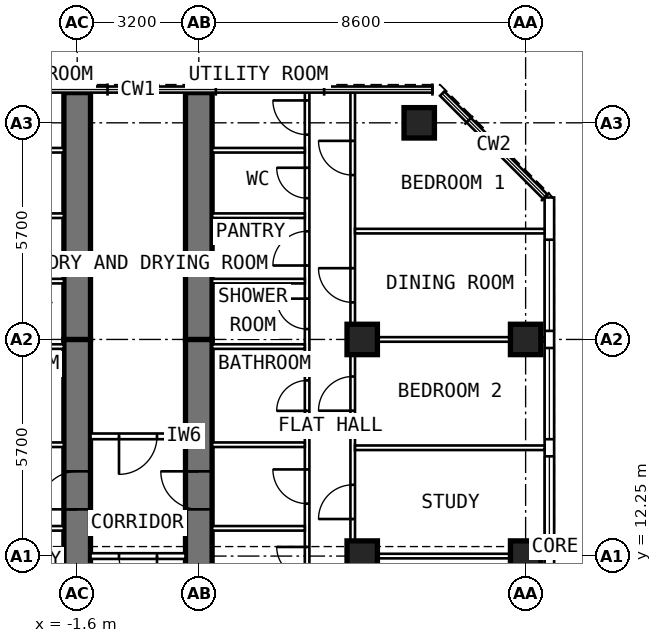
"""IFC4 building model, lengths in metres.
Left out: names, types, materials, properties, quantities, classifications, styles, units other than length and angle.
Written with IfcOpenShell. Run it as: python <this file> out.ifc"""

import sys

from ifc_helpers import new_model, si_unit, direction, frame, frame_2d, origin, origin_2d, place, context, subcontext, project, spatial, rectangle, extrude, element, fill, save


model = new_model("IFC4")
c1 = context("Model", 3, precision=1e-05, world=origin(), true_north=direction((0.0, 1.0)))
c2 = subcontext(c1, "Body", "Model", "MODEL_VIEW")
j1 = project(units=[si_unit("LENGTHUNIT", "METRE"), si_unit("PLANEANGLEUNIT", "RADIAN")], contexts=[c1])
p1 = place(None, origin())
s1 = spatial("IfcSite", under=j1, at=p1, CompositionType="ELEMENT")
p2 = place(p1, origin())
s2 = spatial("IfcBuilding", under=s1, at=p2, CompositionType="ELEMENT")
p3 = place(p2, frame((0.0, 0.0, 285.4)))
s3 = spatial("IfcBuildingStorey", under=s2, at=p3, CompositionType="ELEMENT", Elevation=285.4)
for number, where, z_axis, x_axis in (
    (1, (10.2, 12.25, 0.0), (0.0, 0.0, 1.0), (0.0, 1.0, 0.0)),
    (2, (10.2, 17.95, 0.0), (0.0, 0.0, 1.0), (0.0, 1.0, 0.0)),
    (3, (7.4, 23.65, 0.0), (0.0, 0.0, 1.0), (0.0, 1.0, 0.0)),
    (4, (5.9, 12.25, 0.0), (0.0, 0.0, 1.0), (0.0, 1.0, 0.0)),
    (5, (5.9, 17.95, 0.0), (0.0, 0.0, 1.0), (0.0, 1.0, 0.0)),
):
    element("IfcColumn", number, at=place(p3, frame(where, z_axis=z_axis, x_axis=x_axis)), inside=s3, PredefinedType="COLUMN", context=c2, shape_type="SweptSolid", body=[
        extrude(rectangle(XDim=0.8, YDim=0.8, at=origin_2d()), origin(), (0.0, 0.0, 1.0), 3.6),
    ])
p4 = place(p3, frame((-1.6, 9.6, 0.0), z_axis=(0.0, 0.0, 1.0), x_axis=(0.0, 1.0, 0.0)))
e6 = element("IfcWall", 6, at=p4, inside=s3, PredefinedType="SHEAR", context=c2, shape_type="SweptSolid", body=[
    extrude(rectangle(XDim=8.35, YDim=0.7, at=frame_2d((4.175, 0.0))), origin(), (0.0, 0.0, 1.0), 3.6),
])
p5 = place(p4, frame((3.88, 0.0, 0.0)))
e7 = element("IfcOpeningElement", 7, at=p5, cuts=e6, PredefinedType="OPENING", context=c2, shape_type="SweptSolid", body=[
    extrude(rectangle(XDim=1.0, YDim=2.1, at=frame_2d((0.5, 1.05))), frame((0.0, 0.362, 0.0), z_axis=(0.0, -1.0, 0.0), x_axis=(1.0, 0.0, 0.0)), (0.0, 0.0, 1.0), 0.724),
])
p6 = place(p3, frame((-1.6, 17.95, 0.0), z_axis=(0.0, 0.0, 1.0), x_axis=(0.0, 1.0, 0.0)))
e8 = element("IfcWall", 8, at=p6, inside=s3, PredefinedType="SHEAR", context=c2, shape_type="SweptSolid", body=[
    extrude(rectangle(XDim=6.495, YDim=0.7, at=frame_2d((3.248, 0.0))), origin(), (0.0, 0.0, 1.0), 3.6),
])
p7 = place(p3, frame((1.6, 9.6, 0.0), z_axis=(0.0, 0.0, 1.0), x_axis=(0.0, 1.0, 0.0)))
e9 = element("IfcWall", 9, at=p7, inside=s3, PredefinedType="SHEAR", context=c2, shape_type="SweptSolid", body=[
    extrude(rectangle(XDim=8.35, YDim=0.7, at=frame_2d((4.175, 0.0))), origin(), (0.0, 0.0, 1.0), 3.6),
])
p8 = place(p7, frame((3.88, 0.0, 0.0)))
e10 = element("IfcOpeningElement", 10, at=p8, cuts=e9, PredefinedType="OPENING", context=c2, shape_type="SweptSolid", body=[
    extrude(rectangle(XDim=1.0, YDim=2.1, at=frame_2d((0.5, 1.05))), frame((0.0, 0.362, 0.0), z_axis=(0.0, -1.0, 0.0), x_axis=(1.0, 0.0, 0.0)), (0.0, 0.0, 1.0), 0.724),
])
p9 = place(p3, frame((1.6, 17.95, 0.0), z_axis=(0.0, 0.0, 1.0), x_axis=(0.0, 1.0, 0.0)))
e11 = element("IfcWall", 11, at=p9, inside=s3, PredefinedType="SHEAR", context=c2, shape_type="SweptSolid", body=[
    extrude(rectangle(XDim=6.495, YDim=0.7, at=frame_2d((3.248, 0.0))), origin(), (0.0, 0.0, 1.0), 3.6),
])
p10 = place(p3, frame((10.825, 6.409, 0.0), z_axis=(0.0, 0.0, 1.0), x_axis=(0.0, 1.0, 0.0)))
e12 = element("IfcWall", 12, at=p10, inside=s3, PredefinedType="SOLIDWALL", context=c2, shape_type="SweptSolid", body=[
    extrude(rectangle(XDim=15.276, YDim=0.25, at=frame_2d((7.638, 0.0))), origin(), (0.0, 0.0, 1.0), 3.35),
])
p11 = place(p10, frame((0.366, 0.0, 0.6)))
e13 = element("IfcOpeningElement", 13, at=p11, cuts=e12, PredefinedType="OPENING", context=c2, shape_type="SweptSolid", body=[
    extrude(rectangle(XDim=2.4, YDim=2.0, at=frame_2d((1.2, 1.0))), frame((0.0, 0.137, 0.0), z_axis=(0.0, -1.0, 0.0), x_axis=(1.0, 0.0, 0.0)), (0.0, 0.0, 1.0), 0.274),
])
p12 = place(p10, frame((3.216, 0.0, 0.6)))
e14 = element("IfcOpeningElement", 14, at=p12, cuts=e12, PredefinedType="OPENING", context=c2, shape_type="SweptSolid", body=[
    extrude(rectangle(XDim=2.4, YDim=2.0, at=frame_2d((1.2, 1.0))), frame((0.0, 0.137, 0.0), z_axis=(0.0, -1.0, 0.0), x_axis=(1.0, 0.0, 0.0)), (0.0, 0.0, 1.0), 0.274),
])
p13 = place(p10, frame((6.066, 0.0, 0.6)))
e15 = element("IfcOpeningElement", 15, at=p13, cuts=e12, PredefinedType="OPENING", context=c2, shape_type="SweptSolid", body=[
    extrude(rectangle(XDim=2.4, YDim=2.0, at=frame_2d((1.2, 1.0))), frame((0.0, 0.137, 0.0), z_axis=(0.0, -1.0, 0.0), x_axis=(1.0, 0.0, 0.0)), (0.0, 0.0, 1.0), 0.274),
])
p14 = place(p10, frame((8.916, 0.0, 0.6)))
e16 = element("IfcOpeningElement", 16, at=p14, cuts=e12, PredefinedType="OPENING", context=c2, shape_type="SweptSolid", body=[
    extrude(rectangle(XDim=2.4, YDim=2.0, at=frame_2d((1.2, 1.0))), frame((0.0, 0.137, 0.0), z_axis=(0.0, -1.0, 0.0), x_axis=(1.0, 0.0, 0.0)), (0.0, 0.0, 1.0), 0.274),
])
p15 = place(p10, frame((11.766, 0.0, 0.6)))
e17 = element("IfcOpeningElement", 17, at=p15, cuts=e12, PredefinedType="OPENING", context=c2, shape_type="SweptSolid", body=[
    extrude(rectangle(XDim=2.4, YDim=2.0, at=frame_2d((1.2, 1.0))), frame((0.0, 0.137, 0.0), z_axis=(0.0, -1.0, 0.0), x_axis=(1.0, 0.0, 0.0)), (0.0, 0.0, 1.0), 0.274),
])
for number, where, z_axis, x_axis in (
    (18, (-1.95, 12.98, 0.0), (0.0, 0.0, 1.0), (-1.0, 0.0, 0.0)),
    (19, (-1.95, 15.18, 0.0), (0.0, 0.0, 1.0), (-1.0, 0.0, 0.0)),
):
    element("IfcWall", number, at=place(p3, frame(where, z_axis=z_axis, x_axis=x_axis)), inside=s3, PredefinedType="PARTITIONING", context=c2, shape_type="SweptSolid", body=[
        extrude(rectangle(XDim=2.44, YDim=0.12, at=frame_2d((1.22, 0.0))), origin(), (0.0, 0.0, 1.0), 3.35),
    ])
p16 = place(p3, frame((-1.95, 17.763, 0.0), z_axis=(0.0, 0.0, 1.0), x_axis=(-1.0, 0.0, 0.0)))
e20 = element("IfcWall", 20, at=p16, inside=s3, PredefinedType="PARTITIONING", context=c2, shape_type="SweptSolid", body=[
    extrude(rectangle(XDim=2.44, YDim=0.12, at=frame_2d((1.22, 0.0))), origin(), (0.0, 0.0, 1.0), 2.45),
])
for number, where, z_axis, x_axis in (
    (21, (-1.95, 19.485, 0.0), (0.0, 0.0, 1.0), (-1.0, 0.0, 0.0)),
    (22, (-1.95, 21.206, 0.0), (0.0, 0.0, 1.0), (-1.0, 0.0, 0.0)),
    (23, (-1.95, 22.928, 0.0), (0.0, 0.0, 1.0), (-1.0, 0.0, 0.0)),
):
    element("IfcWall", number, at=place(p3, frame(where, z_axis=z_axis, x_axis=x_axis)), inside=s3, PredefinedType="PARTITIONING", context=c2, shape_type="SweptSolid", body=[
        extrude(rectangle(XDim=2.44, YDim=0.12, at=frame_2d((1.22, 0.0))), origin(), (0.0, 0.0, 1.0), 3.35),
    ])
p17 = place(p3, frame((4.45, 9.85, 0.0), z_axis=(0.0, 0.0, 1.0), x_axis=(0.0, 1.0, 0.0)))
e24 = element("IfcWall", 24, at=p17, inside=s3, PredefinedType="PARTITIONING", context=c2, shape_type="SweptSolid", body=[
    extrude(rectangle(XDim=14.595, YDim=0.12, at=frame_2d((7.297, 0.0))), origin(), (0.0, 0.0, 1.0), 3.35),
])
p18 = place(p17, frame((1.84, 0.0, 0.0)))
e25 = element("IfcOpeningElement", 25, at=p18, cuts=e24, PredefinedType="OPENING", context=c2, shape_type="SweptSolid", body=[
    extrude(rectangle(XDim=0.8, YDim=2.1, at=frame_2d((0.4, 1.05))), frame((0.0, 0.072, 0.0), z_axis=(0.0, -1.0, 0.0), x_axis=(1.0, 0.0, 0.0)), (0.0, 0.0, 1.0), 0.144),
])
p19 = place(p17, frame((3.78, 0.0, 0.0)))
e26 = element("IfcOpeningElement", 26, at=p19, cuts=e24, PredefinedType="OPENING", context=c2, shape_type="SweptSolid", body=[
    extrude(rectangle(XDim=0.9, YDim=2.1, at=frame_2d((0.45, 1.05))), frame((0.0, 0.072, 0.0), z_axis=(0.0, -1.0, 0.0), x_axis=(1.0, 0.0, 0.0)), (0.0, 0.0, 1.0), 0.144),
])
p20 = place(p17, frame((6.221, 0.0, 0.0)))
e27 = element("IfcOpeningElement", 27, at=p20, cuts=e24, PredefinedType="OPENING", context=c2, shape_type="SweptSolid", body=[
    extrude(rectangle(XDim=0.8, YDim=2.1, at=frame_2d((0.4, 1.05))), frame((0.0, 0.072, 0.0), z_axis=(0.0, -1.0, 0.0), x_axis=(1.0, 0.0, 0.0)), (0.0, 0.0, 1.0), 0.144),
])
p21 = place(p17, frame((8.374, 0.0, 0.0)))
e28 = element("IfcOpeningElement", 28, at=p21, cuts=e24, PredefinedType="OPENING", context=c2, shape_type="SweptSolid", body=[
    extrude(rectangle(XDim=0.8, YDim=2.1, at=frame_2d((0.4, 1.05))), frame((0.0, 0.072, 0.0), z_axis=(0.0, -1.0, 0.0), x_axis=(1.0, 0.0, 0.0)), (0.0, 0.0, 1.0), 0.144),
])
p22 = place(p17, frame((10.045, 0.0, 0.0)))
e29 = element("IfcOpeningElement", 29, at=p22, cuts=e24, PredefinedType="OPENING", context=c2, shape_type="SweptSolid", body=[
    extrude(rectangle(XDim=0.9, YDim=2.1, at=frame_2d((0.45, 1.05))), frame((0.0, 0.072, 0.0), z_axis=(0.0, -1.0, 0.0), x_axis=(1.0, 0.0, 0.0)), (0.0, 0.0, 1.0), 0.144),
])
p23 = place(p17, frame((11.817, 0.0, 0.0)))
e30 = element("IfcOpeningElement", 30, at=p23, cuts=e24, PredefinedType="OPENING", context=c2, shape_type="SweptSolid", body=[
    extrude(rectangle(XDim=0.8, YDim=2.1, at=frame_2d((0.4, 1.05))), frame((0.0, 0.072, 0.0), z_axis=(0.0, -1.0, 0.0), x_axis=(1.0, 0.0, 0.0)), (0.0, 0.0, 1.0), 0.144),
])
p24 = place(p17, frame((13.489, 0.0, 0.0)))
e31 = element("IfcOpeningElement", 31, at=p24, cuts=e24, PredefinedType="OPENING", context=c2, shape_type="SweptSolid", body=[
    extrude(rectangle(XDim=0.9, YDim=2.1, at=frame_2d((0.45, 1.05))), frame((0.0, 0.072, 0.0), z_axis=(0.0, -1.0, 0.0), x_axis=(1.0, 0.0, 0.0)), (0.0, 0.0, 1.0), 0.144),
])
p25 = place(p3, frame((5.65, 9.6, 0.0), z_axis=(0.0, 0.0, 1.0), x_axis=(0.0, 1.0, 0.0)))
e32 = element("IfcWall", 32, at=p25, inside=s3, PredefinedType="PARTITIONING", context=c2, shape_type="SweptSolid", body=[
    extrude(rectangle(XDim=14.845, YDim=0.12, at=frame_2d((7.422, 0.0))), origin(), (0.0, 0.0, 1.0), 3.35),
])
p26 = place(p25, frame((1.075, 0.0, 0.0)))
e33 = element("IfcOpeningElement", 33, at=p26, cuts=e32, PredefinedType="OPENING", context=c2, shape_type="SweptSolid", body=[
    extrude(rectangle(XDim=0.9, YDim=2.1, at=frame_2d((0.45, 1.05))), frame((0.0, 0.072, 0.0), z_axis=(0.0, -1.0, 0.0), x_axis=(1.0, 0.0, 0.0)), (0.0, 0.0, 1.0), 0.144),
])
p27 = place(p25, frame((3.625, 0.0, 0.0)))
e34 = element("IfcOpeningElement", 34, at=p27, cuts=e32, PredefinedType="OPENING", context=c2, shape_type="SweptSolid", body=[
    extrude(rectangle(XDim=0.9, YDim=2.1, at=frame_2d((0.45, 1.05))), frame((0.0, 0.072, 0.0), z_axis=(0.0, -1.0, 0.0), x_axis=(1.0, 0.0, 0.0)), (0.0, 0.0, 1.0), 0.144),
])
p28 = place(p25, frame((6.475, 0.0, 0.0)))
e35 = element("IfcOpeningElement", 35, at=p28, cuts=e32, PredefinedType="OPENING", context=c2, shape_type="SweptSolid", body=[
    extrude(rectangle(XDim=0.9, YDim=2.1, at=frame_2d((0.45, 1.05))), frame((0.0, 0.072, 0.0), z_axis=(0.0, -1.0, 0.0), x_axis=(1.0, 0.0, 0.0)), (0.0, 0.0, 1.0), 0.144),
])
p29 = place(p25, frame((9.325, 0.0, 0.0)))
e36 = element("IfcOpeningElement", 36, at=p29, cuts=e32, PredefinedType="OPENING", context=c2, shape_type="SweptSolid", body=[
    extrude(rectangle(XDim=0.9, YDim=2.1, at=frame_2d((0.45, 1.05))), frame((0.0, 0.072, 0.0), z_axis=(0.0, -1.0, 0.0), x_axis=(1.0, 0.0, 0.0)), (0.0, 0.0, 1.0), 0.144),
])
p30 = place(p25, frame((12.675, 0.0, 0.0)))
e37 = element("IfcOpeningElement", 37, at=p30, cuts=e32, PredefinedType="OPENING", context=c2, shape_type="SweptSolid", body=[
    extrude(rectangle(XDim=0.9, YDim=2.1, at=frame_2d((0.45, 1.05))), frame((0.0, 0.072, 0.0), z_axis=(0.0, -1.0, 0.0), x_axis=(1.0, 0.0, 0.0)), (0.0, 0.0, 1.0), 0.144),
])
p31 = place(p3, frame((5.71, 12.25, 0.0), z_axis=(0.0, 0.0, 1.0), x_axis=(1.0, 0.0, 0.0)))
e38 = element("IfcWall", 38, at=p31, inside=s3, PredefinedType="PARTITIONING", context=c2, shape_type="SweptSolid", body=[
    extrude(rectangle(XDim=4.99, YDim=0.12, at=frame_2d((2.495, 0.0))), origin(), (0.0, 0.0, 1.0), 2.45),
])
p32 = place(p3, frame((5.71, 15.1, 0.0), z_axis=(0.0, 0.0, 1.0), x_axis=(1.0, 0.0, 0.0)))
e39 = element("IfcWall", 39, at=p32, inside=s3, PredefinedType="PARTITIONING", context=c2, shape_type="SweptSolid", body=[
    extrude(rectangle(XDim=4.99, YDim=0.12, at=frame_2d((2.495, 0.0))), origin(), (0.0, 0.0, 1.0), 3.35),
])
p33 = place(p3, frame((5.71, 17.95, 0.0), z_axis=(0.0, 0.0, 1.0), x_axis=(1.0, 0.0, 0.0)))
e40 = element("IfcWall", 40, at=p33, inside=s3, PredefinedType="PARTITIONING", context=c2, shape_type="SweptSolid", body=[
    extrude(rectangle(XDim=4.99, YDim=0.12, at=frame_2d((2.495, 0.0))), origin(), (0.0, 0.0, 1.0), 2.45),
])
p34 = place(p3, frame((5.71, 20.8, 0.0), z_axis=(0.0, 0.0, 1.0), x_axis=(1.0, 0.0, 0.0)))
e41 = element("IfcWall", 41, at=p34, inside=s3, PredefinedType="PARTITIONING", context=c2, shape_type="SweptSolid", body=[
    extrude(rectangle(XDim=4.99, YDim=0.12, at=frame_2d((2.495, 0.0))), origin(), (0.0, 0.0, 1.0), 3.35),
])
for number, where, z_axis, x_axis in (
    (42, (1.95, 12.98, 0.0), (0.0, 0.0, 1.0), (1.0, 0.0, 0.0)),
    (43, (1.95, 15.18, 0.0), (0.0, 0.0, 1.0), (1.0, 0.0, 0.0)),
):
    element("IfcWall", number, at=place(p3, frame(where, z_axis=z_axis, x_axis=x_axis)), inside=s3, PredefinedType="PARTITIONING", context=c2, shape_type="SweptSolid", body=[
        extrude(rectangle(XDim=2.44, YDim=0.12, at=frame_2d((1.22, 0.0))), origin(), (0.0, 0.0, 1.0), 3.35),
    ])
p35 = place(p3, frame((1.95, 17.763, 0.0), z_axis=(0.0, 0.0, 1.0), x_axis=(1.0, 0.0, 0.0)))
e44 = element("IfcWall", 44, at=p35, inside=s3, PredefinedType="PARTITIONING", context=c2, shape_type="SweptSolid", body=[
    extrude(rectangle(XDim=2.44, YDim=0.12, at=frame_2d((1.22, 0.0))), origin(), (0.0, 0.0, 1.0), 2.45),
])
for number, where, z_axis, x_axis in (
    (45, (1.95, 19.485, 0.0), (0.0, 0.0, 1.0), (1.0, 0.0, 0.0)),
    (46, (1.95, 21.206, 0.0), (0.0, 0.0, 1.0), (1.0, 0.0, 0.0)),
    (47, (1.95, 22.928, 0.0), (0.0, 0.0, 1.0), (1.0, 0.0, 0.0)),
):
    element("IfcWall", number, at=place(p3, frame(where, z_axis=z_axis, x_axis=x_axis)), inside=s3, PredefinedType="PARTITIONING", context=c2, shape_type="SweptSolid", body=[
        extrude(rectangle(XDim=2.44, YDim=0.12, at=frame_2d((1.22, 0.0))), origin(), (0.0, 0.0, 1.0), 3.35),
    ])
p36 = place(p3, frame((1.25, 15.4, 0.0), z_axis=(0.0, 0.0, 1.0), x_axis=(-1.0, 0.0, 0.0)))
e48 = element("IfcWall", 48, at=p36, inside=s3, PredefinedType="PARTITIONING", context=c2, shape_type="SweptSolid", body=[
    extrude(rectangle(XDim=2.5, YDim=0.15, at=frame_2d((1.25, 0.0))), origin(), (0.0, 0.0, 1.0), 3.35),
])
p37 = place(p36, frame((0.75, 0.0, 0.0)))
e49 = element("IfcOpeningElement", 49, at=p37, cuts=e48, PredefinedType="OPENING", context=c2, shape_type="SweptSolid", body=[
    extrude(rectangle(XDim=1.0, YDim=2.1, at=frame_2d((0.5, 1.05))), frame((0.0, 0.087, 0.0), z_axis=(0.0, -1.0, 0.0), x_axis=(1.0, 0.0, 0.0)), (0.0, 0.0, 1.0), 0.174),
])
p38 = place(p3, frame((1.25, 12.25, 0.0), z_axis=(0.0, 0.0, 1.0), x_axis=(-1.0, 0.0, 0.0)))
e50 = element("IfcWall", 50, at=p38, inside=s3, PredefinedType="PARTITIONING", context=c2, shape_type="SweptSolid", body=[
    extrude(rectangle(XDim=2.5, YDim=0.15, at=frame_2d((1.25, 0.0))), origin(), (0.0, 0.0, 1.0), 3.35),
])
p39 = place(p38, frame((0.75, 0.0, 0.0)))
e51 = element("IfcOpeningElement", 51, at=p39, cuts=e50, PredefinedType="OPENING", context=c2, shape_type="SweptSolid", body=[
    extrude(rectangle(XDim=1.0, YDim=2.1, at=frame_2d((0.5, 1.05))), frame((0.0, 0.087, 0.0), z_axis=(0.0, -1.0, 0.0), x_axis=(1.0, 0.0, 0.0)), (0.0, 0.0, 1.0), 0.174),
])
p40 = place(p13, origin())
e52 = element("IfcWindow", 52, at=p40, inside=s3, PartitioningType="SINGLE_PANEL", PredefinedType="WINDOW", context=c2, shape_type="SweptSolid", body=[
    extrude(rectangle(XDim=2.4, YDim=2.0, at=frame_2d((1.2, 1.0))), frame((0.0, 0.03, 0.0), z_axis=(0.0, -1.0, 0.0), x_axis=(1.0, 0.0, 0.0)), (0.0, 0.0, 1.0), 0.06),
])
fill(e15, e52)
p41 = place(p14, origin())
e53 = element("IfcWindow", 53, at=p41, inside=s3, PartitioningType="SINGLE_PANEL", PredefinedType="WINDOW", context=c2, shape_type="SweptSolid", body=[
    extrude(rectangle(XDim=2.4, YDim=2.0, at=frame_2d((1.2, 1.0))), frame((0.0, 0.03, 0.0), z_axis=(0.0, -1.0, 0.0), x_axis=(1.0, 0.0, 0.0)), (0.0, 0.0, 1.0), 0.06),
])
fill(e16, e53)
p42 = place(p15, origin())
e54 = element("IfcWindow", 54, at=p42, inside=s3, PartitioningType="SINGLE_PANEL", PredefinedType="WINDOW", context=c2, shape_type="SweptSolid", body=[
    extrude(rectangle(XDim=2.4, YDim=2.0, at=frame_2d((1.2, 1.0))), frame((0.0, 0.03, 0.0), z_axis=(0.0, -1.0, 0.0), x_axis=(1.0, 0.0, 0.0)), (0.0, 0.0, 1.0), 0.06),
])
fill(e17, e54)
p43 = place(p5, origin())
e55 = element("IfcDoor", 55, at=p43, inside=s3, OperationType="SINGLE_SWING_LEFT", PredefinedType="DOOR", context=c2, shape_type="SweptSolid", body=[
    extrude(rectangle(XDim=1.0, YDim=2.1, at=frame_2d((0.5, 1.05))), frame((0.0, 0.1, 0.0), z_axis=(0.0, -1.0, 0.0), x_axis=(1.0, 0.0, 0.0)), (0.0, 0.0, 1.0), 0.2),
])
fill(e7, e55)
p44 = place(p8, origin())
e56 = element("IfcDoor", 56, at=p44, inside=s3, OperationType="SINGLE_SWING_RIGHT", PredefinedType="DOOR", context=c2, shape_type="SweptSolid", body=[
    extrude(rectangle(XDim=1.0, YDim=2.1, at=frame_2d((0.5, 1.05))), frame((0.0, 0.1, 0.0), z_axis=(0.0, -1.0, 0.0), x_axis=(1.0, 0.0, 0.0)), (0.0, 0.0, 1.0), 0.2),
])
fill(e10, e56)
p45 = place(p27, origin())
e57 = element("IfcDoor", 57, at=p45, inside=s3, OperationType="SINGLE_SWING_LEFT", PredefinedType="DOOR", context=c2, shape_type="SweptSolid", body=[
    extrude(rectangle(XDim=0.9, YDim=2.1, at=frame_2d((0.45, 1.05))), frame((0.0, 0.025, 0.0), z_axis=(0.0, -1.0, 0.0), x_axis=(1.0, 0.0, 0.0)), (0.0, 0.0, 1.0), 0.05),
])
fill(e34, e57)
p46 = place(p28, origin())
e58 = element("IfcDoor", 58, at=p46, inside=s3, OperationType="SINGLE_SWING_LEFT", PredefinedType="DOOR", context=c2, shape_type="SweptSolid", body=[
    extrude(rectangle(XDim=0.9, YDim=2.1, at=frame_2d((0.45, 1.05))), frame((0.0, 0.025, 0.0), z_axis=(0.0, -1.0, 0.0), x_axis=(1.0, 0.0, 0.0)), (0.0, 0.0, 1.0), 0.05),
])
fill(e35, e58)
p47 = place(p29, origin())
e59 = element("IfcDoor", 59, at=p47, inside=s3, OperationType="SINGLE_SWING_RIGHT", PredefinedType="DOOR", context=c2, shape_type="SweptSolid", body=[
    extrude(rectangle(XDim=0.9, YDim=2.1, at=frame_2d((0.45, 1.05))), frame((0.0, 0.025, 0.0), z_axis=(0.0, -1.0, 0.0), x_axis=(1.0, 0.0, 0.0)), (0.0, 0.0, 1.0), 0.05),
])
fill(e36, e59)
p48 = place(p30, origin())
e60 = element("IfcDoor", 60, at=p48, inside=s3, OperationType="SINGLE_SWING_RIGHT", PredefinedType="DOOR", context=c2, shape_type="SweptSolid", body=[
    extrude(rectangle(XDim=0.9, YDim=2.1, at=frame_2d((0.45, 1.05))), frame((0.0, 0.025, 0.0), z_axis=(0.0, -1.0, 0.0), x_axis=(1.0, 0.0, 0.0)), (0.0, 0.0, 1.0), 0.05),
])
fill(e37, e60)
p49 = place(p18, origin())
e61 = element("IfcDoor", 61, at=p49, inside=s3, OperationType="SINGLE_SWING_RIGHT", PredefinedType="DOOR", context=c2, shape_type="SweptSolid", body=[
    extrude(rectangle(XDim=0.8, YDim=2.1, at=frame_2d((0.4, 1.05))), frame((0.0, 0.025, 0.0), z_axis=(0.0, -1.0, 0.0), x_axis=(1.0, 0.0, 0.0)), (0.0, 0.0, 1.0), 0.05),
])
fill(e25, e61)
p50 = place(p19, origin())
e62 = element("IfcDoor", 62, at=p50, inside=s3, OperationType="SINGLE_SWING_RIGHT", PredefinedType="DOOR", context=c2, shape_type="SweptSolid", body=[
    extrude(rectangle(XDim=0.9, YDim=2.1, at=frame_2d((0.45, 1.05))), frame((0.0, 0.025, 0.0), z_axis=(0.0, -1.0, 0.0), x_axis=(1.0, 0.0, 0.0)), (0.0, 0.0, 1.0), 0.05),
])
fill(e26, e62)
p51 = place(p20, origin())
e63 = element("IfcDoor", 63, at=p51, inside=s3, OperationType="SINGLE_SWING_LEFT", PredefinedType="DOOR", context=c2, shape_type="SweptSolid", body=[
    extrude(rectangle(XDim=0.8, YDim=2.1, at=frame_2d((0.4, 1.05))), frame((0.0, 0.025, 0.0), z_axis=(0.0, -1.0, 0.0), x_axis=(1.0, 0.0, 0.0)), (0.0, 0.0, 1.0), 0.05),
])
fill(e27, e63)
p52 = place(p21, origin())
e64 = element("IfcDoor", 64, at=p52, inside=s3, OperationType="SINGLE_SWING_RIGHT", PredefinedType="DOOR", context=c2, shape_type="SweptSolid", body=[
    extrude(rectangle(XDim=0.8, YDim=2.1, at=frame_2d((0.4, 1.05))), frame((0.0, 0.025, 0.0), z_axis=(0.0, -1.0, 0.0), x_axis=(1.0, 0.0, 0.0)), (0.0, 0.0, 1.0), 0.05),
])
fill(e28, e64)
p53 = place(p22, origin())
e65 = element("IfcDoor", 65, at=p53, inside=s3, OperationType="SINGLE_SWING_LEFT", PredefinedType="DOOR", context=c2, shape_type="SweptSolid", body=[
    extrude(rectangle(XDim=0.9, YDim=2.1, at=frame_2d((0.45, 1.05))), frame((0.0, 0.025, 0.0), z_axis=(0.0, -1.0, 0.0), x_axis=(1.0, 0.0, 0.0)), (0.0, 0.0, 1.0), 0.05),
])
fill(e29, e65)
p54 = place(p23, origin())
e66 = element("IfcDoor", 66, at=p54, inside=s3, OperationType="SINGLE_SWING_RIGHT", PredefinedType="DOOR", context=c2, shape_type="SweptSolid", body=[
    extrude(rectangle(XDim=0.8, YDim=2.1, at=frame_2d((0.4, 1.05))), frame((0.0, 0.025, 0.0), z_axis=(0.0, -1.0, 0.0), x_axis=(1.0, 0.0, 0.0)), (0.0, 0.0, 1.0), 0.05),
])
fill(e30, e66)
p55 = place(p24, origin())
e67 = element("IfcDoor", 67, at=p55, inside=s3, OperationType="SINGLE_SWING_RIGHT", PredefinedType="DOOR", context=c2, shape_type="SweptSolid", body=[
    extrude(rectangle(XDim=0.9, YDim=2.1, at=frame_2d((0.45, 1.05))), frame((0.0, 0.025, 0.0), z_axis=(0.0, -1.0, 0.0), x_axis=(1.0, 0.0, 0.0)), (0.0, 0.0, 1.0), 0.05),
])
fill(e31, e67)
p56 = place(p37, origin())
e68 = element("IfcDoor", 68, at=p56, inside=s3, OperationType="SINGLE_SWING_RIGHT", PredefinedType="DOOR", context=c2, shape_type="SweptSolid", body=[
    extrude(rectangle(XDim=1.0, YDim=2.1, at=frame_2d((0.5, 1.05))), frame((0.0, 0.025, 0.0), z_axis=(0.0, -1.0, 0.0), x_axis=(1.0, 0.0, 0.0)), (0.0, 0.0, 1.0), 0.05),
])
fill(e49, e68)
p57 = place(p39, origin())
e69 = element("IfcDoor", 69, at=p57, inside=s3, OperationType="SINGLE_SWING_LEFT", PredefinedType="DOOR", context=c2, shape_type="SweptSolid", body=[
    extrude(rectangle(XDim=1.0, YDim=2.1, at=frame_2d((0.5, 1.05))), frame((0.0, 0.025, 0.0), z_axis=(0.0, -1.0, 0.0), x_axis=(1.0, 0.0, 0.0)), (0.0, 0.0, 1.0), 0.05),
])
fill(e51, e69)
save(model, sys.argv[1])
